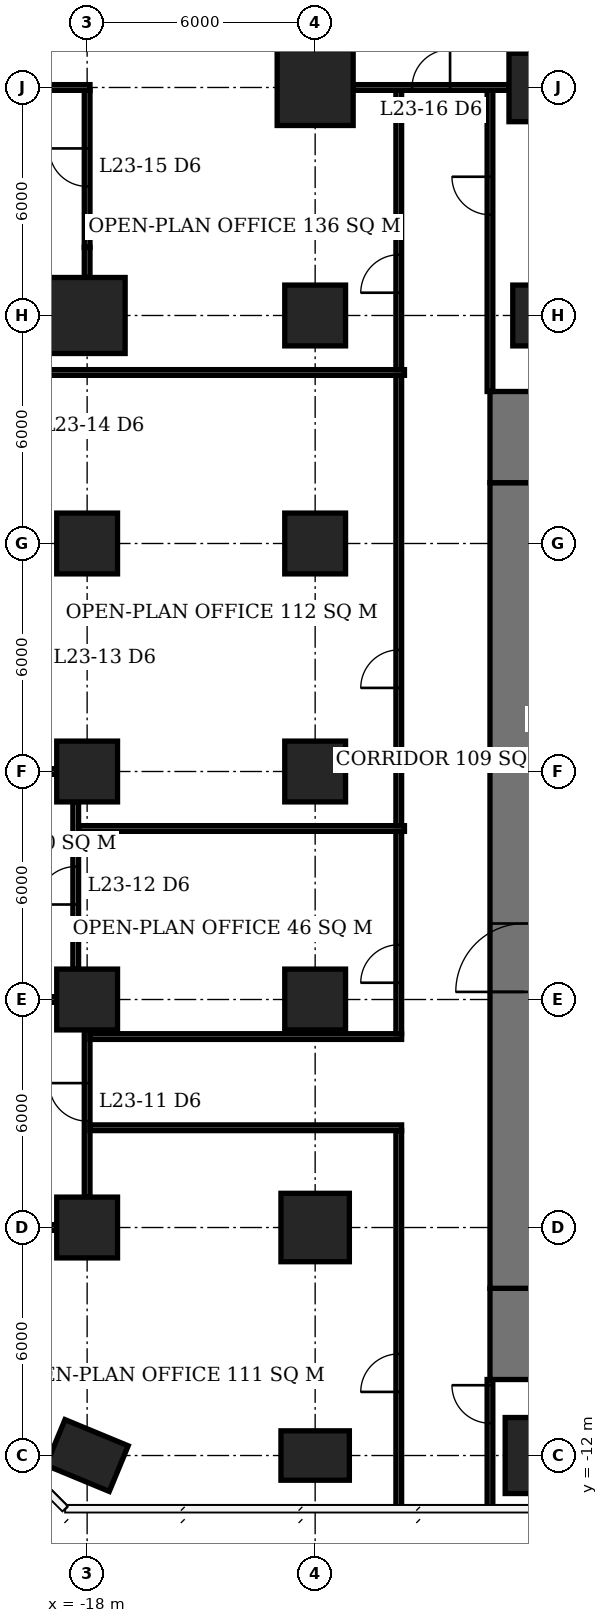
"""IFC4 building model, lengths in metres.
Left out: names, types, materials, properties, quantities, classifications, styles, units other than length and angle.
Written with IfcOpenShell. Run it as: python <this file> out.ifc"""

import sys

from ifc_helpers import new_model, si_unit, direction, frame, frame_2d, origin, origin_2d, place, context, subcontext, project, spatial, rectangle, extrude, element, fill, save


model = new_model("IFC4")
c1 = context("Model", 3, precision=1e-05, world=origin(), true_north=direction((0.0, 1.0)))
c2 = subcontext(c1, "Body", "Model", "MODEL_VIEW")
j1 = project(units=[si_unit("LENGTHUNIT", "METRE"), si_unit("PLANEANGLEUNIT", "RADIAN")], contexts=[c1])
p1 = place(None, origin())
s1 = spatial("IfcSite", under=j1, at=p1, CompositionType="ELEMENT")
p2 = place(p1, origin())
s2 = spatial("IfcBuilding", under=s1, at=p2, CompositionType="ELEMENT")
p3 = place(p2, frame((0.0, 0.0, 97.7)))
s3 = spatial("IfcBuildingStorey", under=s2, at=p3, CompositionType="ELEMENT", Elevation=97.7)
p4 = place(p3, frame((-18.0, -12.0, 0.0), z_axis=(0.0, 0.0, 1.0), x_axis=(-0.923879532511, 0.382683432365, 0.0)))
e1 = element("IfcColumn", 1, at=p4, inside=s3, PredefinedType="COLUMN", context=c2, shape_type="SweptSolid", body=[
    extrude(rectangle(XDim=1.8, YDim=1.3, at=origin_2d()), origin(), (0.0, 0.0, 1.0), 3.9),
])
for number, where, z_axis, x_axis in (
    (2, (-18.0, -6.0, 0.0), (0.0, 0.0, 1.0), (1.0, 0.0, 0.0)),
    (3, (-18.0, 0.0, 0.0), (0.0, 0.0, 1.0), (1.0, 0.0, 0.0)),
    (4, (-18.0, 6.0, 0.0), (0.0, 0.0, 1.0), (1.0, 0.0, 0.0)),
    (5, (-18.0, 12.0, 0.0), (0.0, 0.0, 1.0), (1.0, 0.0, 0.0)),
):
    element("IfcColumn", number, at=place(p3, frame(where, z_axis=z_axis, x_axis=x_axis)), inside=s3, PredefinedType="COLUMN", context=c2, shape_type="SweptSolid", body=[
        extrude(rectangle(XDim=1.6, YDim=1.6, at=origin_2d()), origin(), (0.0, 0.0, 1.0), 3.9),
    ])
p5 = place(p3, frame((-18.0, 18.0, 0.0), z_axis=(0.0, 0.0, 1.0), x_axis=(1.0, 0.0, 0.0)))
e6 = element("IfcColumn", 6, at=p5, inside=s3, PredefinedType="COLUMN", context=c2, shape_type="SweptSolid", body=[
    extrude(rectangle(XDim=2.0, YDim=2.0, at=origin_2d()), origin(), (0.0, 0.0, 1.0), 3.9),
])
p6 = place(p3, frame((-12.0, -12.0, 0.0), z_axis=(0.0, 0.0, 1.0), x_axis=(1.0, 0.0, 0.0)))
e7 = element("IfcColumn", 7, at=p6, inside=s3, PredefinedType="COLUMN", context=c2, shape_type="SweptSolid", body=[
    extrude(rectangle(XDim=1.8, YDim=1.3, at=origin_2d()), origin(), (0.0, 0.0, 1.0), 3.9),
])
p7 = place(p3, frame((-12.0, -6.0, 0.0), z_axis=(0.0, 0.0, 1.0), x_axis=(1.0, 0.0, 0.0)))
e8 = element("IfcColumn", 8, at=p7, inside=s3, PredefinedType="COLUMN", context=c2, shape_type="SweptSolid", body=[
    extrude(rectangle(XDim=1.8, YDim=1.8, at=origin_2d()), origin(), (0.0, 0.0, 1.0), 3.9),
])
for number, where, z_axis, x_axis in (
    (9, (-12.0, 0.0, 0.0), (0.0, 0.0, 1.0), (1.0, 0.0, 0.0)),
    (10, (-12.0, 6.0, 0.0), (0.0, 0.0, 1.0), (1.0, 0.0, 0.0)),
    (11, (-12.0, 12.0, 0.0), (0.0, 0.0, 1.0), (1.0, 0.0, 0.0)),
    (12, (-12.0, 18.0, 0.0), (0.0, 0.0, 1.0), (1.0, 0.0, 0.0)),
):
    element("IfcColumn", number, at=place(p3, frame(where, z_axis=z_axis, x_axis=x_axis)), inside=s3, PredefinedType="COLUMN", context=c2, shape_type="SweptSolid", body=[
        extrude(rectangle(XDim=1.6, YDim=1.6, at=origin_2d()), origin(), (0.0, 0.0, 1.0), 3.9),
    ])
for number, where, z_axis, x_axis in (
    (13, (-12.0, 24.0, 0.0), (0.0, 0.0, 1.0), (1.0, 0.0, 0.0)),
    (14, (-6.0, -12.0, 0.0), (0.0, 0.0, 1.0), (1.0, 0.0, 0.0)),
):
    element("IfcColumn", number, at=place(p3, frame(where, z_axis=z_axis, x_axis=x_axis)), inside=s3, PredefinedType="COLUMN", context=c2, shape_type="SweptSolid", body=[
        extrude(rectangle(XDim=2.0, YDim=2.0, at=origin_2d()), origin(), (0.0, 0.0, 1.0), 3.9),
    ])
p8 = place(p3, frame((-6.0, 18.0, 0.0), z_axis=(0.0, 0.0, 1.0), x_axis=(1.0, 0.0, 0.0)))
e15 = element("IfcColumn", 15, at=p8, inside=s3, PredefinedType="COLUMN", context=c2, shape_type="SweptSolid", body=[
    extrude(rectangle(XDim=1.6, YDim=1.6, at=origin_2d()), origin(), (0.0, 0.0, 1.0), 3.9),
])
p9 = place(p3, frame((-6.0, 24.0, 0.0), z_axis=(0.0, 0.0, 1.0), x_axis=(1.0, 0.0, 0.0)))
e16 = element("IfcColumn", 16, at=p9, inside=s3, PredefinedType="COLUMN", context=c2, shape_type="SweptSolid", body=[
    extrude(rectangle(XDim=1.8, YDim=1.8, at=origin_2d()), origin(), (0.0, 0.0, 1.0), 3.9),
])
p10 = place(p3, frame((-6.5, -7.6, 0.0), z_axis=(0.0, 0.0, 1.0), x_axis=(0.0, 1.0, 0.0)))
e17 = element("IfcWall", 17, at=p10, inside=s3, PredefinedType="SHEAR", context=c2, shape_type="SweptSolid", body=[
    extrude(rectangle(XDim=21.2, YDim=1.8, at=frame_2d((10.6, 0.0))), origin(), (0.0, 0.0, 1.0), 3.9),
])
p11 = place(p10, frame((7.8, 0.0, 0.0)))
e18 = element("IfcOpeningElement", 18, at=p11, cuts=e17, PredefinedType="OPENING", context=c2, shape_type="SweptSolid", body=[
    extrude(rectangle(XDim=1.8, YDim=2.4, at=frame_2d((0.9, 1.2))), frame((0.0, 0.91, 0.0), z_axis=(0.0, -1.0, 0.0), x_axis=(1.0, 0.0, 0.0)), (0.0, 0.0, 1.0), 1.82),
])
for number, where, z_axis, x_axis in (
    (19, (-6.5, -10.0, 0.0), (0.0, 0.0, 1.0), (0.0, 1.0, 0.0)),
    (20, (-6.5, 13.6, 0.0), (0.0, 0.0, 1.0), (0.0, 1.0, 0.0)),
):
    element("IfcWall", number, at=place(p3, frame(where, z_axis=z_axis, x_axis=x_axis)), inside=s3, PredefinedType="SHEAR", context=c2, shape_type="SweptSolid", body=[
        extrude(rectangle(XDim=2.4, YDim=1.8, at=frame_2d((1.2, 0.0))), origin(), (0.0, 0.0, 1.0), 3.9),
    ])
for number, where, z_axis, x_axis in (
    (21, (-22.31, -6.0, 0.0), (0.0, 0.0, 1.0), (1.0, 0.0, 0.0)),
    (22, (-22.31, 0.0, 0.0), (0.0, 0.0, 1.0), (1.0, 0.0, 0.0)),
):
    element("IfcWall", number, at=place(p3, frame(where, z_axis=z_axis, x_axis=x_axis)), inside=s3, PredefinedType="PARTITIONING", context=c2, shape_type="SweptSolid", body=[
        extrude(rectangle(XDim=3.51, YDim=0.15, at=frame_2d((1.755, 0.0))), origin(), (0.0, 0.0, 1.0), 2.65),
    ])
p12 = place(p3, frame((-19.2, 6.0, 0.0), z_axis=(0.0, 0.0, 1.0), x_axis=(1.0, 0.0, 0.0)))
e23 = element("IfcWall", 23, at=p12, inside=s3, PredefinedType="PARTITIONING", context=c2, shape_type="SweptSolid", body=[
    extrude(rectangle(XDim=0.4, YDim=0.15, at=frame_2d((0.2, 0.0))), origin(), (0.0, 0.0, 1.0), 2.65),
])
p13 = place(p3, frame((-19.31, 24.0, 0.0), z_axis=(0.0, 0.0, 1.0), x_axis=(1.0, 0.0, 0.0)))
e24 = element("IfcWall", 24, at=p13, inside=s3, PredefinedType="PARTITIONING", context=c2, shape_type="SweptSolid", body=[
    extrude(rectangle(XDim=1.385, YDim=0.15, at=frame_2d((0.692, 0.0))), origin(), (0.0, 0.0, 1.0), 3.65),
])
p14 = place(p3, frame((-11.0, 24.0, 0.0), z_axis=(0.0, 0.0, 1.0), x_axis=(1.0, 0.0, 0.0)))
e25 = element("IfcWall", 25, at=p14, inside=s3, PredefinedType="PARTITIONING", context=c2, shape_type="SweptSolid", body=[
    extrude(rectangle(XDim=4.1, YDim=0.15, at=frame_2d((2.05, 0.0))), origin(), (0.0, 0.0, 1.0), 3.65),
])
p15 = place(p14, frame((1.55, 0.0, 0.0)))
e26 = element("IfcOpeningElement", 26, at=p15, cuts=e25, PredefinedType="OPENING", context=c2, shape_type="SweptSolid", body=[
    extrude(rectangle(XDim=1.0, YDim=2.1, at=frame_2d((0.5, 1.05))), frame((0.0, 0.085, 0.0), z_axis=(0.0, -1.0, 0.0), x_axis=(1.0, 0.0, 0.0)), (0.0, 0.0, 1.0), 0.17),
])
p16 = place(p3, frame((-18.3, 0.8, 0.0), z_axis=(0.0, 0.0, 1.0), x_axis=(0.0, 1.0, 0.0)))
e27 = element("IfcWall", 27, at=p16, inside=s3, PredefinedType="PARTITIONING", context=c2, shape_type="SweptSolid", body=[
    extrude(rectangle(XDim=4.4, YDim=0.15, at=frame_2d((2.2, 0.0))), origin(), (0.0, 0.0, 1.0), 3.65),
])
p17 = place(p16, frame((1.7, 0.0, 0.0)))
e28 = element("IfcOpeningElement", 28, at=p17, cuts=e27, PredefinedType="OPENING", context=c2, shape_type="SweptSolid", body=[
    extrude(rectangle(XDim=1.0, YDim=2.1, at=frame_2d((0.5, 1.05))), frame((0.0, 0.085, 0.0), z_axis=(0.0, -1.0, 0.0), x_axis=(1.0, 0.0, 0.0)), (0.0, 0.0, 1.0), 0.17),
])
p18 = place(p3, frame((-18.0, -5.2, 0.0), z_axis=(0.0, 0.0, 1.0), x_axis=(0.0, 1.0, 0.0)))
e29 = element("IfcWall", 29, at=p18, inside=s3, PredefinedType="PARTITIONING", context=c2, shape_type="SweptSolid", body=[
    extrude(rectangle(XDim=4.4, YDim=0.15, at=frame_2d((2.2, 0.0))), origin(), (0.0, 0.0, 1.0), 3.65),
])
p19 = place(p18, frame((2.0, 0.0, 0.0)))
e30 = element("IfcOpeningElement", 30, at=p19, cuts=e29, PredefinedType="OPENING", context=c2, shape_type="SweptSolid", body=[
    extrude(rectangle(XDim=1.0, YDim=2.1, at=frame_2d((0.5, 1.05))), frame((0.0, 0.085, 0.0), z_axis=(0.0, -1.0, 0.0), x_axis=(1.0, 0.0, 0.0)), (0.0, 0.0, 1.0), 0.17),
])
p20 = place(p3, frame((-18.0, 19.0, 0.0), z_axis=(0.0, 0.0, 1.0), x_axis=(0.0, 1.0, 0.0)))
e31 = element("IfcWall", 31, at=p20, inside=s3, PredefinedType="PARTITIONING", context=c2, shape_type="SweptSolid", body=[
    extrude(rectangle(XDim=0.792, YDim=0.15, at=frame_2d((0.396, 0.0))), origin(), (0.0, 0.0, 1.0), 2.65),
])
p21 = place(p3, frame((-18.0, 19.792, 0.0), z_axis=(0.0, 0.0, 1.0), x_axis=(0.0, 1.0, 0.0)))
e32 = element("IfcWall", 32, at=p21, inside=s3, PredefinedType="PARTITIONING", context=c2, shape_type="SweptSolid", body=[
    extrude(rectangle(XDim=4.133, YDim=0.15, at=frame_2d((2.066, 0.0))), origin(), (0.0, 0.0, 1.0), 3.65),
])
p22 = place(p21, frame((1.604, 0.0, 0.0)))
e33 = element("IfcOpeningElement", 33, at=p22, cuts=e32, PredefinedType="OPENING", context=c2, shape_type="SweptSolid", body=[
    extrude(rectangle(XDim=1.0, YDim=2.1, at=frame_2d((0.5, 1.05))), frame((0.0, 0.085, 0.0), z_axis=(0.0, -1.0, 0.0), x_axis=(1.0, 0.0, 0.0)), (0.0, 0.0, 1.0), 0.17),
])
p23 = place(p3, frame((-19.425, 16.5, 0.0), z_axis=(0.0, 0.0, 1.0), x_axis=(1.0, 0.0, 0.0)))
e34 = element("IfcWall", 34, at=p23, inside=s3, PredefinedType="PARTITIONING", context=c2, shape_type="SweptSolid", body=[
    extrude(rectangle(XDim=9.775, YDim=0.15, at=frame_2d((4.888, 0.0))), origin(), (0.0, 0.0, 1.0), 3.65),
])
p24 = place(p3, frame((-18.225, 4.5, 0.0), z_axis=(0.0, 0.0, 1.0), x_axis=(1.0, 0.0, 0.0)))
e35 = element("IfcWall", 35, at=p24, inside=s3, PredefinedType="PARTITIONING", context=c2, shape_type="SweptSolid", body=[
    extrude(rectangle(XDim=8.575, YDim=0.15, at=frame_2d((4.288, 0.0))), origin(), (0.0, 0.0, 1.0), 3.65),
])
for number, where, z_axis, x_axis in (
    (36, (-17.925, -3.375, 0.0), (0.0, 0.0, 1.0), (1.0, 0.0, 0.0)),
    (37, (-17.925, -0.975, 0.0), (0.0, 0.0, 1.0), (1.0, 0.0, 0.0)),
):
    element("IfcWall", number, at=place(p3, frame(where, z_axis=z_axis, x_axis=x_axis)), inside=s3, PredefinedType="PARTITIONING", context=c2, shape_type="SweptSolid", body=[
        extrude(rectangle(XDim=8.2, YDim=0.15, at=frame_2d((4.1, 0.0))), origin(), (0.0, 0.0, 1.0), 3.65),
    ])
p25 = place(p3, frame((-9.8, -13.4, 0.0), z_axis=(0.0, 0.0, 1.0), x_axis=(0.0, 1.0, 0.0)))
e38 = element("IfcWall", 38, at=p25, inside=s3, PredefinedType="PARTITIONING", context=c2, shape_type="SweptSolid", body=[
    extrude(rectangle(XDim=9.95, YDim=0.15, at=frame_2d((4.975, 0.0))), origin(), (0.0, 0.0, 1.0), 3.65),
])
p26 = place(p25, frame((3.074, 0.0, 0.0)))
e39 = element("IfcOpeningElement", 39, at=p26, cuts=e38, PredefinedType="OPENING", context=c2, shape_type="SweptSolid", body=[
    extrude(rectangle(XDim=1.0, YDim=2.1, at=frame_2d((0.5, 1.05))), frame((0.0, 0.085, 0.0), z_axis=(0.0, -1.0, 0.0), x_axis=(1.0, 0.0, 0.0)), (0.0, 0.0, 1.0), 0.17),
])
p27 = place(p3, frame((-9.8, -0.9, 0.0), z_axis=(0.0, 0.0, 1.0), x_axis=(0.0, 1.0, 0.0)))
e40 = element("IfcWall", 40, at=p27, inside=s3, PredefinedType="PARTITIONING", context=c2, shape_type="SweptSolid", body=[
    extrude(rectangle(XDim=5.325, YDim=0.15, at=frame_2d((2.663, 0.0))), origin(), (0.0, 0.0, 1.0), 3.65),
])
p28 = place(p27, frame((1.341, 0.0, 0.0)))
e41 = element("IfcOpeningElement", 41, at=p28, cuts=e40, PredefinedType="OPENING", context=c2, shape_type="SweptSolid", body=[
    extrude(rectangle(XDim=1.0, YDim=2.1, at=frame_2d((0.5, 1.05))), frame((0.0, 0.085, 0.0), z_axis=(0.0, -1.0, 0.0), x_axis=(1.0, 0.0, 0.0)), (0.0, 0.0, 1.0), 0.17),
])
p29 = place(p3, frame((-9.8, 4.575, 0.0), z_axis=(0.0, 0.0, 1.0), x_axis=(0.0, 1.0, 0.0)))
e42 = element("IfcWall", 42, at=p29, inside=s3, PredefinedType="PARTITIONING", context=c2, shape_type="SweptSolid", body=[
    extrude(rectangle(XDim=11.85, YDim=0.15, at=frame_2d((5.925, 0.0))), origin(), (0.0, 0.0, 1.0), 3.65),
])
p30 = place(p29, frame((3.625, 0.0, 0.0)))
e43 = element("IfcOpeningElement", 43, at=p30, cuts=e42, PredefinedType="OPENING", context=c2, shape_type="SweptSolid", body=[
    extrude(rectangle(XDim=1.0, YDim=2.1, at=frame_2d((0.5, 1.05))), frame((0.0, 0.085, 0.0), z_axis=(0.0, -1.0, 0.0), x_axis=(1.0, 0.0, 0.0)), (0.0, 0.0, 1.0), 0.17),
])
p31 = place(p3, frame((-9.8, 16.575, 0.0), z_axis=(0.0, 0.0, 1.0), x_axis=(0.0, 1.0, 0.0)))
e44 = element("IfcWall", 44, at=p31, inside=s3, PredefinedType="PARTITIONING", context=c2, shape_type="SweptSolid", body=[
    extrude(rectangle(XDim=7.35, YDim=0.15, at=frame_2d((3.675, 0.0))), origin(), (0.0, 0.0, 1.0), 3.65),
])
p32 = place(p31, frame((2.024, 0.0, 0.0)))
e45 = element("IfcOpeningElement", 45, at=p32, cuts=e44, PredefinedType="OPENING", context=c2, shape_type="SweptSolid", body=[
    extrude(rectangle(XDim=1.0, YDim=2.1, at=frame_2d((0.5, 1.05))), frame((0.0, 0.085, 0.0), z_axis=(0.0, -1.0, 0.0), x_axis=(1.0, 0.0, 0.0)), (0.0, 0.0, 1.0), 0.17),
])
p33 = place(p3, frame((-7.4, -13.4, 0.0), z_axis=(0.0, 0.0, 1.0), x_axis=(0.0, 1.0, 0.0)))
e46 = element("IfcWall", 46, at=p33, inside=s3, PredefinedType="PARTITIONING", context=c2, shape_type="SweptSolid", body=[
    extrude(rectangle(XDim=3.4, YDim=0.15, at=frame_2d((1.7, 0.0))), origin(), (0.0, 0.0, 1.0), 3.65),
])
p34 = place(p33, frame((2.25, 0.0, 0.0)))
e47 = element("IfcOpeningElement", 47, at=p34, cuts=e46, PredefinedType="OPENING", context=c2, shape_type="SweptSolid", body=[
    extrude(rectangle(XDim=1.0, YDim=2.1, at=frame_2d((0.5, 1.05))), frame((0.0, 0.085, 0.0), z_axis=(0.0, -1.0, 0.0), x_axis=(1.0, 0.0, 0.0)), (0.0, 0.0, 1.0), 0.17),
])
p35 = place(p3, frame((-7.4, 16.0, 0.0), z_axis=(0.0, 0.0, 1.0), x_axis=(0.0, 1.0, 0.0)))
e48 = element("IfcWall", 48, at=p35, inside=s3, PredefinedType="PARTITIONING", context=c2, shape_type="SweptSolid", body=[
    extrude(rectangle(XDim=7.925, YDim=0.15, at=frame_2d((3.962, 0.0))), origin(), (0.0, 0.0, 1.0), 3.65),
])
p36 = place(p35, frame((4.651, 0.0, 0.0)))
e49 = element("IfcOpeningElement", 49, at=p36, cuts=e48, PredefinedType="OPENING", context=c2, shape_type="SweptSolid", body=[
    extrude(rectangle(XDim=1.0, YDim=2.1, at=frame_2d((0.5, 1.05))), frame((0.0, 0.085, 0.0), z_axis=(0.0, -1.0, 0.0), x_axis=(1.0, 0.0, 0.0)), (0.0, 0.0, 1.0), 0.17),
])
p37 = place(p11, origin())
e50 = element("IfcDoor", 50, at=p37, inside=s3, OperationType="DOUBLE_DOOR_SINGLE_SWING", PredefinedType="DOOR", context=c2, shape_type="SweptSolid", body=[
    extrude(rectangle(XDim=1.8, YDim=2.4, at=frame_2d((0.9, 1.2))), frame((0.0, 0.025, 0.0), z_axis=(0.0, -1.0, 0.0), x_axis=(1.0, 0.0, 0.0)), (0.0, 0.0, 1.0), 0.05),
])
fill(e18, e50)
p38 = place(p19, origin())
e51 = element("IfcDoor", 51, at=p38, inside=s3, OperationType="SINGLE_SWING_RIGHT", PredefinedType="DOOR", context=c2, shape_type="SweptSolid", body=[
    extrude(rectangle(XDim=1.0, YDim=2.1, at=frame_2d((0.5, 1.05))), frame((0.0, 0.025, 0.0), z_axis=(0.0, -1.0, 0.0), x_axis=(1.0, 0.0, 0.0)), (0.0, 0.0, 1.0), 0.05),
])
fill(e30, e51)
p39 = place(p17, origin())
e52 = element("IfcDoor", 52, at=p39, inside=s3, OperationType="SINGLE_SWING_LEFT", PredefinedType="DOOR", context=c2, shape_type="SweptSolid", body=[
    extrude(rectangle(XDim=1.0, YDim=2.1, at=frame_2d((0.5, 1.05))), frame((0.0, 0.025, 0.0), z_axis=(0.0, -1.0, 0.0), x_axis=(1.0, 0.0, 0.0)), (0.0, 0.0, 1.0), 0.05),
])
fill(e28, e52)
p40 = place(p22, origin())
e53 = element("IfcDoor", 53, at=p40, inside=s3, OperationType="SINGLE_SWING_RIGHT", PredefinedType="DOOR", context=c2, shape_type="SweptSolid", body=[
    extrude(rectangle(XDim=1.0, YDim=2.1, at=frame_2d((0.5, 1.05))), frame((0.0, 0.025, 0.0), z_axis=(0.0, -1.0, 0.0), x_axis=(1.0, 0.0, 0.0)), (0.0, 0.0, 1.0), 0.05),
])
fill(e33, e53)
p41 = place(p15, origin())
e54 = element("IfcDoor", 54, at=p41, inside=s3, OperationType="SINGLE_SWING_RIGHT", PredefinedType="DOOR", context=c2, shape_type="SweptSolid", body=[
    extrude(rectangle(XDim=1.0, YDim=2.1, at=frame_2d((0.5, 1.05))), frame((0.0, 0.025, 0.0), z_axis=(0.0, -1.0, 0.0), x_axis=(1.0, 0.0, 0.0)), (0.0, 0.0, 1.0), 0.05),
])
fill(e26, e54)
p42 = place(p26, origin())
e55 = element("IfcDoor", 55, at=p42, inside=s3, OperationType="SINGLE_SWING_LEFT", PredefinedType="DOOR", context=c2, shape_type="SweptSolid", body=[
    extrude(rectangle(XDim=1.0, YDim=2.1, at=frame_2d((0.5, 1.05))), frame((0.0, 0.025, 0.0), z_axis=(0.0, -1.0, 0.0), x_axis=(1.0, 0.0, 0.0)), (0.0, 0.0, 1.0), 0.05),
])
fill(e39, e55)
p43 = place(p30, origin())
e56 = element("IfcDoor", 56, at=p43, inside=s3, OperationType="SINGLE_SWING_LEFT", PredefinedType="DOOR", context=c2, shape_type="SweptSolid", body=[
    extrude(rectangle(XDim=1.0, YDim=2.1, at=frame_2d((0.5, 1.05))), frame((0.0, 0.025, 0.0), z_axis=(0.0, -1.0, 0.0), x_axis=(1.0, 0.0, 0.0)), (0.0, 0.0, 1.0), 0.05),
])
fill(e43, e56)
p44 = place(p36, origin())
e57 = element("IfcDoor", 57, at=p44, inside=s3, OperationType="SINGLE_SWING_RIGHT", PredefinedType="DOOR", context=c2, shape_type="SweptSolid", body=[
    extrude(rectangle(XDim=1.0, YDim=2.1, at=frame_2d((0.5, 1.05))), frame((0.0, 0.025, 0.0), z_axis=(0.0, -1.0, 0.0), x_axis=(1.0, 0.0, 0.0)), (0.0, 0.0, 1.0), 0.05),
])
fill(e49, e57)
p45 = place(p32, origin())
e58 = element("IfcDoor", 58, at=p45, inside=s3, OperationType="SINGLE_SWING_LEFT", PredefinedType="DOOR", context=c2, shape_type="SweptSolid", body=[
    extrude(rectangle(XDim=1.0, YDim=2.1, at=frame_2d((0.5, 1.05))), frame((0.0, 0.025, 0.0), z_axis=(0.0, -1.0, 0.0), x_axis=(1.0, 0.0, 0.0)), (0.0, 0.0, 1.0), 0.05),
])
fill(e45, e58)
p46 = place(p28, origin())
e59 = element("IfcDoor", 59, at=p46, inside=s3, OperationType="SINGLE_SWING_LEFT", PredefinedType="DOOR", context=c2, shape_type="SweptSolid", body=[
    extrude(rectangle(XDim=1.0, YDim=2.1, at=frame_2d((0.5, 1.05))), frame((0.0, 0.025, 0.0), z_axis=(0.0, -1.0, 0.0), x_axis=(1.0, 0.0, 0.0)), (0.0, 0.0, 1.0), 0.05),
])
fill(e41, e59)
p47 = place(p34, origin())
e60 = element("IfcDoor", 60, at=p47, inside=s3, OperationType="SINGLE_SWING_RIGHT", PredefinedType="DOOR", context=c2, shape_type="SweptSolid", body=[
    extrude(rectangle(XDim=1.0, YDim=2.1, at=frame_2d((0.5, 1.05))), frame((0.0, 0.025, 0.0), z_axis=(0.0, -1.0, 0.0), x_axis=(1.0, 0.0, 0.0)), (0.0, 0.0, 1.0), 0.05),
])
fill(e47, e60)
save(model, sys.argv[1])
